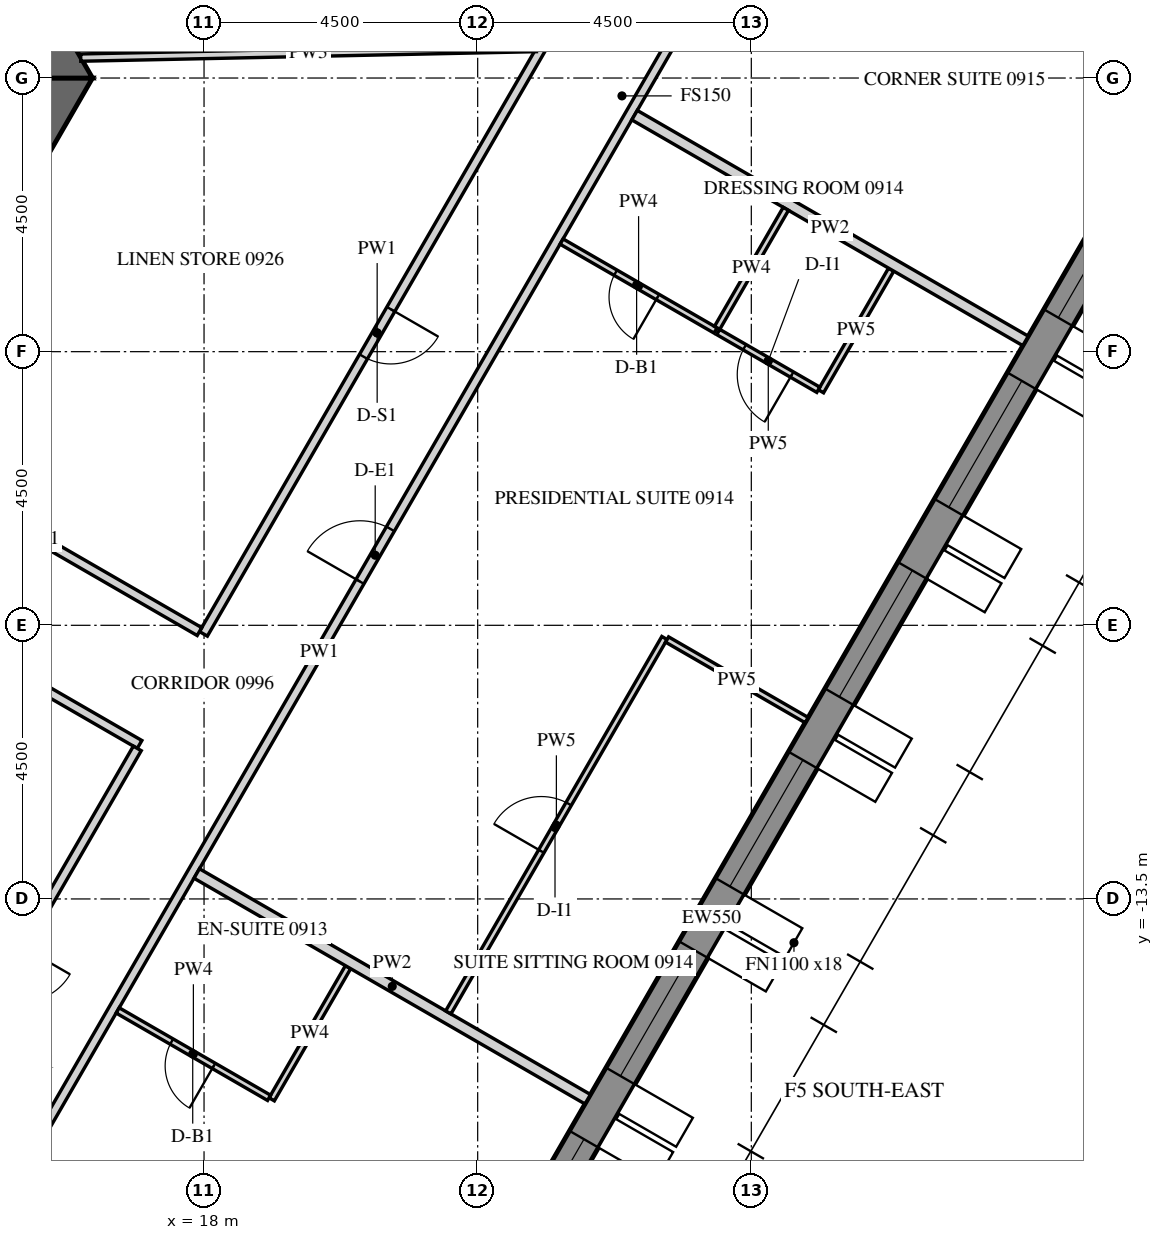
"""IFC4 building model, lengths in metres.
Left out: names, types, materials, properties, quantities, classifications, styles, units other than length and angle.
Written with IfcOpenShell. Run it as: python <this file> out.ifc"""

import sys

from ifc_helpers import new_model, si_unit, direction, frame, frame_2d, origin, place, context, subcontext, project, spatial, polyline, rectangle, outline, extrude, element, fill, save


model = new_model("IFC4")
c1 = context("Model", 3, precision=1e-05, world=origin(), true_north=direction((0.0, 1.0)))
c2 = subcontext(c1, "Body", "Model", "MODEL_VIEW")
j1 = project(units=[si_unit("LENGTHUNIT", "METRE"), si_unit("PLANEANGLEUNIT", "RADIAN")], contexts=[c1])
p1 = place(None, origin())
s1 = spatial("IfcSite", under=j1, at=p1, CompositionType="ELEMENT")
p2 = place(p1, origin())
s2 = spatial("IfcBuilding", under=s1, at=p2, CompositionType="ELEMENT")
p3 = place(p2, frame((0.0, 0.0, 123.3)))
s3 = spatial("IfcBuildingStorey", under=s2, at=p3, CompositionType="ELEMENT", Elevation=123.3)
p4 = place(p3, frame((18.83, -26.835, -0.15), z_axis=(0.0, 0.0, 1.0), x_axis=(0.500003800416, 0.866023209602, 0.0)))
e1 = element("IfcWall", 1, at=p4, inside=s3, PredefinedType="SOLIDWALL", context=c2, shape_type="SweptSolid", body=[
    extrude(outline(polyline([(-0.022, -0.275), (30.097, -0.275), (30.045, 0.275), (0.022, 0.275), (-0.022, -0.275)])), origin(), (0.0, 0.0, 1.0), 3.9),
])
p5 = place(p4, frame((1.236, 0.0, 1.05)))
e2 = element("IfcOpeningElement", 2, at=p5, cuts=e1, PredefinedType="OPENING", context=c2, shape_type="SweptSolid", body=[
    extrude(rectangle(XDim=2.4, YDim=2.4, at=frame_2d((1.2, 1.2))), frame((0.0, 0.285, 0.0), z_axis=(0.0, -1.0, 0.0), x_axis=(1.0, 0.0, 0.0)), (0.0, 0.0, 1.0), 0.57),
])
p6 = place(p4, frame((4.835, 0.0, 1.05)))
e3 = element("IfcOpeningElement", 3, at=p6, cuts=e1, PredefinedType="OPENING", context=c2, shape_type="SweptSolid", body=[
    extrude(rectangle(XDim=2.4, YDim=2.4, at=frame_2d((1.2, 1.2))), frame((0.0, 0.285, 0.0), z_axis=(0.0, -1.0, 0.0), x_axis=(1.0, 0.0, 0.0)), (0.0, 0.0, 1.0), 0.57),
])
p7 = place(p4, frame((8.436, 0.0, 1.05)))
e4 = element("IfcOpeningElement", 4, at=p7, cuts=e1, PredefinedType="OPENING", context=c2, shape_type="SweptSolid", body=[
    extrude(rectangle(XDim=2.4, YDim=2.4, at=frame_2d((1.2, 1.2))), frame((0.0, 0.285, 0.0), z_axis=(0.0, -1.0, 0.0), x_axis=(1.0, 0.0, 0.0)), (0.0, 0.0, 1.0), 0.57),
])
p8 = place(p4, frame((12.035, 0.0, 1.05)))
e5 = element("IfcOpeningElement", 5, at=p8, cuts=e1, PredefinedType="OPENING", context=c2, shape_type="SweptSolid", body=[
    extrude(rectangle(XDim=2.4, YDim=2.4, at=frame_2d((1.2, 1.2))), frame((0.0, 0.285, 0.0), z_axis=(0.0, -1.0, 0.0), x_axis=(1.0, 0.0, 0.0)), (0.0, 0.0, 1.0), 0.57),
])
p9 = place(p4, frame((15.635, 0.0, 1.05)))
e6 = element("IfcOpeningElement", 6, at=p9, cuts=e1, PredefinedType="OPENING", context=c2, shape_type="SweptSolid", body=[
    extrude(rectangle(XDim=2.4, YDim=2.4, at=frame_2d((1.2, 1.2))), frame((0.0, 0.285, 0.0), z_axis=(0.0, -1.0, 0.0), x_axis=(1.0, 0.0, 0.0)), (0.0, 0.0, 1.0), 0.57),
])
p10 = place(p4, frame((19.236, 0.0, 1.05)))
e7 = element("IfcOpeningElement", 7, at=p10, cuts=e1, PredefinedType="OPENING", context=c2, shape_type="SweptSolid", body=[
    extrude(rectangle(XDim=2.4, YDim=2.4, at=frame_2d((1.2, 1.2))), frame((0.0, 0.285, 0.0), z_axis=(0.0, -1.0, 0.0), x_axis=(1.0, 0.0, 0.0)), (0.0, 0.0, 1.0), 0.57),
])
p11 = place(p4, frame((22.835, 0.0, 1.05)))
e8 = element("IfcOpeningElement", 8, at=p11, cuts=e1, PredefinedType="OPENING", context=c2, shape_type="SweptSolid", body=[
    extrude(rectangle(XDim=2.4, YDim=2.4, at=frame_2d((1.2, 1.2))), frame((0.0, 0.285, 0.0), z_axis=(0.0, -1.0, 0.0), x_axis=(1.0, 0.0, 0.0)), (0.0, 0.0, 1.0), 0.57),
])
p12 = place(p4, frame((26.436, 0.0, 1.05)))
e9 = element("IfcOpeningElement", 9, at=p12, cuts=e1, PredefinedType="OPENING", context=c2, shape_type="SweptSolid", body=[
    extrude(rectangle(XDim=2.4, YDim=2.4, at=frame_2d((1.2, 1.2))), frame((0.0, 0.285, 0.0), z_axis=(0.0, -1.0, 0.0), x_axis=(1.0, 0.0, 0.0)), (0.0, 0.0, 1.0), 0.57),
])
p13 = place(p3, frame((7.91, -13.7, -0.15), z_axis=(0.0, 0.0, 1.0), x_axis=(0.499999880136, 0.866025472988, 0.0)))
e10 = element("IfcWall", 10, at=p13, inside=s3, PredefinedType="SHEAR", context=c2, shape_type="SweptSolid", body=[
    extrude(outline(polyline([(-0.173, -0.3), (15.993, -0.3), (15.646, 0.3), (0.173, 0.3), (-0.173, -0.3)])), origin(), (0.0, 0.0, 1.0), 3.9),
])
p14 = place(p13, frame((7.039, 0.0, 0.15)))
e11 = element("IfcOpeningElement", 11, at=p14, cuts=e10, PredefinedType="OPENING", context=c2, shape_type="SweptSolid", body=[
    extrude(rectangle(XDim=1.8, YDim=2.4, at=frame_2d((0.9, 1.2))), frame((0.0, 0.31, 0.0), z_axis=(0.0, -1.0, 0.0), x_axis=(1.0, 0.0, 0.0)), (0.0, 0.0, 1.0), 0.62),
])
p15 = place(p3, frame((15.819, 0.0, -0.15), z_axis=(0.0, 0.0, 1.0), x_axis=(-0.499999880136, 0.866025472988, 0.0)))
e12 = element("IfcWall", 12, at=p15, inside=s3, PredefinedType="SHEAR", context=c2, shape_type="SweptSolid", body=[
    extrude(outline(polyline([(-0.173, -0.3), (15.993, -0.3), (15.646, 0.3), (0.173, 0.3), (-0.173, -0.3)])), origin(), (0.0, 0.0, 1.0), 3.9),
])
p16 = place(p15, frame((6.981, 0.0, 0.15)))
e13 = element("IfcOpeningElement", 13, at=p16, cuts=e12, PredefinedType="OPENING", context=c2, shape_type="SweptSolid", body=[
    extrude(rectangle(XDim=1.8, YDim=2.4, at=frame_2d((0.9, 1.2))), frame((0.0, 0.31, 0.0), z_axis=(0.0, -1.0, 0.0), x_axis=(1.0, 0.0, 0.0)), (0.0, 0.0, 1.0), 0.62),
])
p17 = place(p3, frame((8.083, -14.0, -0.15), z_axis=(0.0, 0.0, 1.0), x_axis=(0.499997680643, -0.866026742862, 0.0)))
e14 = element("IfcWall", 14, at=p17, inside=s3, PredefinedType="SHEAR", context=c2, shape_type="SweptSolid", body=[
    extrude(rectangle(XDim=16.509, YDim=0.6, at=frame_2d((8.254, 0.0))), origin(), (0.0, 0.0, 1.0), 3.9),
])
p18 = place(p17, frame((7.354, 0.0, 0.15)))
e15 = element("IfcOpeningElement", 15, at=p18, cuts=e14, PredefinedType="OPENING", context=c2, shape_type="SweptSolid", body=[
    extrude(rectangle(XDim=1.8, YDim=2.4, at=frame_2d((0.9, 1.2))), frame((0.0, 0.31, 0.0), z_axis=(0.0, -1.0, 0.0), x_axis=(1.0, 0.0, 0.0)), (0.0, 0.0, 1.0), 0.62),
])
p19 = place(p3, frame((13.928, -19.775, 0.0), z_axis=(0.0, 0.0, 1.0), x_axis=(0.50000450071, 0.866022805283, 0.0)))
e16 = element("IfcWall", 16, at=p19, inside=s3, PredefinedType="PARTITIONING", context=c2, shape_type="SweptSolid", body=[
    extrude(rectangle(XDim=23.877, YDim=0.15, at=frame_2d((11.938, 0.0))), origin(), (0.0, 0.0, 1.0), 2.988),
])
p20 = place(p19, frame((2.043, 0.0, 0.0)))
e17 = element("IfcOpeningElement", 17, at=p20, cuts=e16, PredefinedType="OPENING", context=c2, shape_type="SweptSolid", body=[
    extrude(rectangle(XDim=1.0, YDim=2.1, at=frame_2d((0.5, 1.05))), frame((0.0, 0.085, 0.0), z_axis=(0.0, -1.0, 0.0), x_axis=(1.0, 0.0, 0.0)), (0.0, 0.0, 1.0), 0.17),
])
p21 = place(p19, frame((13.272, 0.0, 0.0)))
e18 = element("IfcOpeningElement", 18, at=p21, cuts=e16, PredefinedType="OPENING", context=c2, shape_type="SweptSolid", body=[
    extrude(rectangle(XDim=1.0, YDim=2.1, at=frame_2d((0.5, 1.05))), frame((0.0, 0.085, 0.0), z_axis=(0.0, -1.0, 0.0), x_axis=(1.0, 0.0, 0.0)), (0.0, 0.0, 1.0), 0.17),
])
p22 = place(p3, frame((23.704, 0.757, 0.0), z_axis=(0.0, 0.0, 1.0), x_axis=(-0.500010297365, -0.866019458516, 0.0)))
e19 = element("IfcWall", 19, at=p22, inside=s3, PredefinedType="PARTITIONING", context=c2, shape_type="SweptSolid", body=[
    extrude(rectangle(XDim=11.429, YDim=0.15, at=frame_2d((5.714, 0.0))), origin(), (0.0, 0.0, 1.0), 2.988),
])
p23 = place(p22, frame((5.264, 0.0, 0.0)))
e20 = element("IfcOpeningElement", 20, at=p23, cuts=e19, PredefinedType="OPENING", context=c2, shape_type="SweptSolid", body=[
    extrude(rectangle(XDim=0.9, YDim=2.1, at=frame_2d((0.45, 1.05))), frame((0.0, 0.085, 0.0), z_axis=(0.0, -1.0, 0.0), x_axis=(1.0, 0.0, 0.0)), (0.0, 0.0, 1.0), 0.17),
])
p24 = place(p3, frame((17.925, -9.103, 0.0), z_axis=(0.0, 0.0, 1.0), x_axis=(-0.866013586754, 0.500020467139, 0.0)))
e21 = element("IfcWall", 21, at=p24, inside=s3, PredefinedType="PARTITIONING", context=c2, shape_type="SweptSolid", body=[
    extrude(rectangle(XDim=6.075, YDim=0.15, at=frame_2d((3.038, 0.0))), origin(), (0.0, 0.0, 1.0), 2.988),
])
p25 = place(p3, frame((11.614, -7.884, 0.0), z_axis=(0.0, 0.0, 1.0), x_axis=(0.866033542371, -0.499985903289, 0.0)))
e22 = element("IfcWall", 22, at=p25, inside=s3, PredefinedType="PARTITIONING", context=c2, shape_type="SweptSolid", body=[
    extrude(rectangle(XDim=6.15, YDim=0.15, at=frame_2d((3.075, 0.0))), origin(), (0.0, 0.0, 1.0), 2.988),
])
p26 = place(p3, frame((16.902, -11.024, 0.0), z_axis=(0.0, 0.0, 1.0), x_axis=(-0.499999527968, -0.866025676312, 0.0)))
e23 = element("IfcWall", 23, at=p26, inside=s3, PredefinedType="PARTITIONING", context=c2, shape_type="SweptSolid", body=[
    extrude(rectangle(XDim=8.441, YDim=0.15, at=frame_2d((4.22, 0.0))), origin(), (0.0, 0.0, 1.0), 2.988),
])
p27 = place(p26, frame((3.771, 0.0, 0.0)))
e24 = element("IfcOpeningElement", 24, at=p27, cuts=e23, PredefinedType="OPENING", context=c2, shape_type="SweptSolid", body=[
    extrude(rectangle(XDim=0.9, YDim=2.1, at=frame_2d((0.45, 1.05))), frame((0.0, 0.085, 0.0), z_axis=(0.0, -1.0, 0.0), x_axis=(1.0, 0.0, 0.0)), (0.0, 0.0, 1.0), 0.17),
])
p28 = place(p3, frame((20.368, -14.622, 0.0), z_axis=(0.0, 0.0, 1.0), x_axis=(-0.50001992892, -0.866013897511, 0.0)))
e25 = element("IfcWall", 25, at=p28, inside=s3, PredefinedType="PARTITIONING", context=c2, shape_type="SweptSolid", body=[
    extrude(rectangle(XDim=2.51, YDim=0.1, at=frame_2d((1.255, 0.0))), origin(), (0.0, 0.0, 1.0), 2.988),
])
p29 = place(p3, frame((19.07, -16.771, 0.0), z_axis=(0.0, 0.0, 1.0), x_axis=(-0.866018712932, 0.500011588718, 0.0)))
e26 = element("IfcWall", 26, at=p29, inside=s3, PredefinedType="PARTITIONING", context=c2, shape_type="SweptSolid", body=[
    extrude(rectangle(XDim=2.875, YDim=0.1, at=frame_2d((1.438, 0.0))), origin(), (0.0, 0.0, 1.0), 2.988),
])
p30 = place(p29, frame((1.05, 0.0, 0.0)))
e27 = element("IfcOpeningElement", 27, at=p30, cuts=e26, PredefinedType="OPENING", context=c2, shape_type="SweptSolid", body=[
    extrude(rectangle(XDim=0.8, YDim=2.1, at=frame_2d((0.4, 1.05))), frame((0.0, 0.06, 0.0), z_axis=(0.0, -1.0, 0.0), x_axis=(1.0, 0.0, 0.0)), (0.0, 0.0, 1.0), 0.12),
])
p31 = place(p3, frame((24.31, -16.794, 0.0), z_axis=(0.0, 0.0, 1.0), x_axis=(-0.866022965479, 0.500004223245, 0.0)))
e28 = element("IfcWall", 28, at=p31, inside=s3, PredefinedType="PARTITIONING", context=c2, shape_type="SweptSolid", body=[
    extrude(rectangle(XDim=7.425, YDim=0.18, at=frame_2d((3.713, 0.0))), origin(), (0.0, 0.0, 1.0), 2.988),
])
p32 = place(p3, frame((26.413, -4.152, 0.0), z_axis=(0.0, 0.0, 1.0), x_axis=(-0.86601045545, 0.500025890382, 0.0)))
e29 = element("IfcWall", 29, at=p32, inside=s3, PredefinedType="PARTITIONING", context=c2, shape_type="SweptSolid", body=[
    extrude(rectangle(XDim=2.925, YDim=0.1, at=frame_2d((1.462, 0.0))), origin(), (0.0, 0.0, 1.0), 2.988),
])
p33 = place(p32, frame((1.1, 0.0, 0.0)))
e30 = element("IfcOpeningElement", 30, at=p33, cuts=e29, PredefinedType="OPENING", context=c2, shape_type="SweptSolid", body=[
    extrude(rectangle(XDim=0.8, YDim=2.1, at=frame_2d((0.4, 1.05))), frame((0.0, 0.06, 0.0), z_axis=(0.0, -1.0, 0.0), x_axis=(1.0, 0.0, 0.0)), (0.0, 0.0, 1.0), 0.12),
])
p34 = place(p3, frame((29.3, -3.151, 0.0), z_axis=(0.0, 0.0, 1.0), x_axis=(-0.499935939261, -0.866062386111, 0.0)))
e31 = element("IfcWall", 31, at=p34, inside=s3, PredefinedType="PARTITIONING", context=c2, shape_type="SweptSolid", body=[
    extrude(rectangle(XDim=2.31, YDim=0.1, at=frame_2d((1.155, 0.0))), origin(), (0.0, 0.0, 1.0), 2.988),
])
p35 = place(p3, frame((28.102, -5.126, 0.0), z_axis=(0.0, 0.0, 1.0), x_axis=(-0.866044365799, 0.499967155389, 0.0)))
e32 = element("IfcWall", 32, at=p35, inside=s3, PredefinedType="PARTITIONING", context=c2, shape_type="SweptSolid", body=[
    extrude(rectangle(XDim=1.9, YDim=0.1, at=frame_2d((0.95, 0.0))), origin(), (0.0, 0.0, 1.0), 2.988),
])
p36 = place(p35, frame((0.5, 0.0, 0.0)))
e33 = element("IfcOpeningElement", 33, at=p36, cuts=e32, PredefinedType="OPENING", context=c2, shape_type="SweptSolid", body=[
    extrude(rectangle(XDim=0.9, YDim=2.1, at=frame_2d((0.45, 1.05))), frame((0.0, 0.06, 0.0), z_axis=(0.0, -1.0, 0.0), x_axis=(1.0, 0.0, 0.0)), (0.0, 0.0, 1.0), 0.12),
])
p37 = place(p3, frame((22.017, -15.366, 0.0), z_axis=(0.0, 0.0, 1.0), x_axis=(0.5000167099, 0.866015756104, 0.0)))
e34 = element("IfcWall", 34, at=p37, inside=s3, PredefinedType="PARTITIONING", context=c2, shape_type="SweptSolid", body=[
    extrude(rectangle(XDim=7.11, YDim=0.1, at=frame_2d((3.555, 0.0))), origin(), (0.0, 0.0, 1.0), 2.988),
])
p38 = place(p37, frame((3.06, 0.0, 0.0)))
e35 = element("IfcOpeningElement", 35, at=p38, cuts=e34, PredefinedType="OPENING", context=c2, shape_type="SweptSolid", body=[
    extrude(rectangle(XDim=0.9, YDim=2.1, at=frame_2d((0.45, 1.05))), frame((0.0, 0.06, 0.0), z_axis=(0.0, -1.0, 0.0), x_axis=(1.0, 0.0, 0.0)), (0.0, 0.0, 1.0), 0.12),
])
p39 = place(p3, frame((25.615, -9.233, 0.0), z_axis=(0.0, 0.0, 1.0), x_axis=(0.865989200783, -0.500062700197, 0.0)))
e36 = element("IfcWall", 36, at=p39, inside=s3, PredefinedType="PARTITIONING", context=c2, shape_type="SweptSolid", body=[
    extrude(rectangle(XDim=2.65, YDim=0.1, at=frame_2d((1.325, 0.0))), origin(), (0.0, 0.0, 1.0), 2.988),
])
p40 = place(p3, frame((31.51, -4.323, 0.0), z_axis=(0.0, 0.0, 1.0), x_axis=(-0.866028983062, 0.499993800457, 0.0)))
e37 = element("IfcWall", 37, at=p40, inside=s3, PredefinedType="PARTITIONING", context=c2, shape_type="SweptSolid", body=[
    extrude(rectangle(XDim=7.425, YDim=0.18, at=frame_2d((3.712, 0.0))), origin(), (0.0, 0.0, 1.0), 2.988),
])
p41 = place(p3, frame((26.438, -4.108, 0.0), z_axis=(0.0, 0.0, 1.0), x_axis=(0.49995000081, 0.866054268906, 0.0)))
e38 = element("IfcWall", 38, at=p41, inside=s3, PredefinedType="PARTITIONING", context=c2, shape_type="SweptSolid", body=[
    extrude(rectangle(XDim=2.26, YDim=0.1, at=frame_2d((1.13, 0.0))), origin(), (0.0, 0.0, 1.0), 2.988),
])
p42 = place(p3, frame((23.466, 0.493, 0.0), z_axis=(0.0, 0.0, 1.0), x_axis=(-0.999779281543, -0.021009240783, 0.0)))
e39 = element("IfcWall", 39, at=p42, inside=s3, PredefinedType="PARTITIONING", context=c2, shape_type="SweptSolid", body=[
    extrude(rectangle(XDim=7.495, YDim=0.12, at=frame_2d((3.748, 0.0))), origin(), (0.0, 0.0, 1.0), 2.988),
])
p43 = place(p7, frame((0.0, 0.205, 0.0)))
e40 = element("IfcWindow", 40, at=p43, inside=s3, PartitioningType="DOUBLE_PANEL_VERTICAL", PredefinedType="WINDOW", context=c2, shape_type="SweptSolid", body=[
    extrude(rectangle(XDim=2.4, YDim=2.4, at=frame_2d((1.2, 1.2))), frame((0.0, 0.03, 0.0), z_axis=(0.0, -1.0, 0.0), x_axis=(1.0, 0.0, 0.0)), (0.0, 0.0, 1.0), 0.06),
])
fill(e4, e40)
p44 = place(p8, frame((0.0, 0.205, 0.0)))
e41 = element("IfcWindow", 41, at=p44, inside=s3, PartitioningType="DOUBLE_PANEL_VERTICAL", PredefinedType="WINDOW", context=c2, shape_type="SweptSolid", body=[
    extrude(rectangle(XDim=2.4, YDim=2.4, at=frame_2d((1.2, 1.2))), frame((0.0, 0.03, 0.0), z_axis=(0.0, -1.0, 0.0), x_axis=(1.0, 0.0, 0.0)), (0.0, 0.0, 1.0), 0.06),
])
fill(e5, e41)
p45 = place(p9, frame((0.0, 0.205, 0.0)))
e42 = element("IfcWindow", 42, at=p45, inside=s3, PartitioningType="DOUBLE_PANEL_VERTICAL", PredefinedType="WINDOW", context=c2, shape_type="SweptSolid", body=[
    extrude(rectangle(XDim=2.4, YDim=2.4, at=frame_2d((1.2, 1.2))), frame((0.0, 0.03, 0.0), z_axis=(0.0, -1.0, 0.0), x_axis=(1.0, 0.0, 0.0)), (0.0, 0.0, 1.0), 0.06),
])
fill(e6, e42)
p46 = place(p10, frame((0.0, 0.205, 0.0)))
e43 = element("IfcWindow", 43, at=p46, inside=s3, PartitioningType="DOUBLE_PANEL_VERTICAL", PredefinedType="WINDOW", context=c2, shape_type="SweptSolid", body=[
    extrude(rectangle(XDim=2.4, YDim=2.4, at=frame_2d((1.2, 1.2))), frame((0.0, 0.03, 0.0), z_axis=(0.0, -1.0, 0.0), x_axis=(1.0, 0.0, 0.0)), (0.0, 0.0, 1.0), 0.06),
])
fill(e7, e43)
p47 = place(p11, frame((0.0, 0.205, 0.0)))
e44 = element("IfcWindow", 44, at=p47, inside=s3, PartitioningType="DOUBLE_PANEL_VERTICAL", PredefinedType="WINDOW", context=c2, shape_type="SweptSolid", body=[
    extrude(rectangle(XDim=2.4, YDim=2.4, at=frame_2d((1.2, 1.2))), frame((0.0, 0.03, 0.0), z_axis=(0.0, -1.0, 0.0), x_axis=(1.0, 0.0, 0.0)), (0.0, 0.0, 1.0), 0.06),
])
fill(e8, e44)
p48 = place(p12, frame((0.0, 0.205, 0.0)))
e45 = element("IfcWindow", 45, at=p48, inside=s3, PartitioningType="DOUBLE_PANEL_VERTICAL", PredefinedType="WINDOW", context=c2, shape_type="SweptSolid", body=[
    extrude(rectangle(XDim=2.4, YDim=2.4, at=frame_2d((1.2, 1.2))), frame((0.0, 0.03, 0.0), z_axis=(0.0, -1.0, 0.0), x_axis=(1.0, 0.0, 0.0)), (0.0, 0.0, 1.0), 0.06),
])
fill(e9, e45)
p49 = place(p30, origin())
e46 = element("IfcDoor", 46, at=p49, inside=s3, OperationType="SINGLE_SWING_LEFT", PredefinedType="DOOR", context=c2, shape_type="SweptSolid", body=[
    extrude(rectangle(XDim=0.8, YDim=2.1, at=frame_2d((0.4, 1.05))), frame((0.0, 0.025, 0.0), z_axis=(0.0, -1.0, 0.0), x_axis=(1.0, 0.0, 0.0)), (0.0, 0.0, 1.0), 0.05),
])
fill(e27, e46)
p50 = place(p21, origin())
e47 = element("IfcDoor", 47, at=p50, inside=s3, OperationType="SINGLE_SWING_RIGHT", PredefinedType="DOOR", context=c2, shape_type="SweptSolid", body=[
    extrude(rectangle(XDim=1.0, YDim=2.1, at=frame_2d((0.5, 1.05))), frame((0.0, 0.025, 0.0), z_axis=(0.0, -1.0, 0.0), x_axis=(1.0, 0.0, 0.0)), (0.0, 0.0, 1.0), 0.05),
])
fill(e18, e47)
p51 = place(p33, origin())
e48 = element("IfcDoor", 48, at=p51, inside=s3, OperationType="SINGLE_SWING_LEFT", PredefinedType="DOOR", context=c2, shape_type="SweptSolid", body=[
    extrude(rectangle(XDim=0.8, YDim=2.1, at=frame_2d((0.4, 1.05))), frame((0.0, 0.025, 0.0), z_axis=(0.0, -1.0, 0.0), x_axis=(1.0, 0.0, 0.0)), (0.0, 0.0, 1.0), 0.05),
])
fill(e30, e48)
p52 = place(p36, origin())
e49 = element("IfcDoor", 49, at=p52, inside=s3, OperationType="SINGLE_SWING_RIGHT", PredefinedType="DOOR", context=c2, shape_type="SweptSolid", body=[
    extrude(rectangle(XDim=0.9, YDim=2.1, at=frame_2d((0.45, 1.05))), frame((0.0, 0.025, 0.0), z_axis=(0.0, -1.0, 0.0), x_axis=(1.0, 0.0, 0.0)), (0.0, 0.0, 1.0), 0.05),
])
fill(e33, e49)
p53 = place(p38, origin())
e50 = element("IfcDoor", 50, at=p53, inside=s3, OperationType="SINGLE_SWING_RIGHT", PredefinedType="DOOR", context=c2, shape_type="SweptSolid", body=[
    extrude(rectangle(XDim=0.9, YDim=2.1, at=frame_2d((0.45, 1.05))), frame((0.0, 0.025, 0.0), z_axis=(0.0, -1.0, 0.0), x_axis=(1.0, 0.0, 0.0)), (0.0, 0.0, 1.0), 0.05),
])
fill(e35, e50)
p54 = place(p23, origin())
e51 = element("IfcDoor", 51, at=p54, inside=s3, OperationType="SINGLE_SWING_RIGHT", PredefinedType="DOOR", context=c2, shape_type="SweptSolid", body=[
    extrude(rectangle(XDim=0.9, YDim=2.1, at=frame_2d((0.45, 1.05))), frame((0.0, 0.025, 0.0), z_axis=(0.0, -1.0, 0.0), x_axis=(1.0, 0.0, 0.0)), (0.0, 0.0, 1.0), 0.05),
])
fill(e20, e51)
save(model, sys.argv[1])
